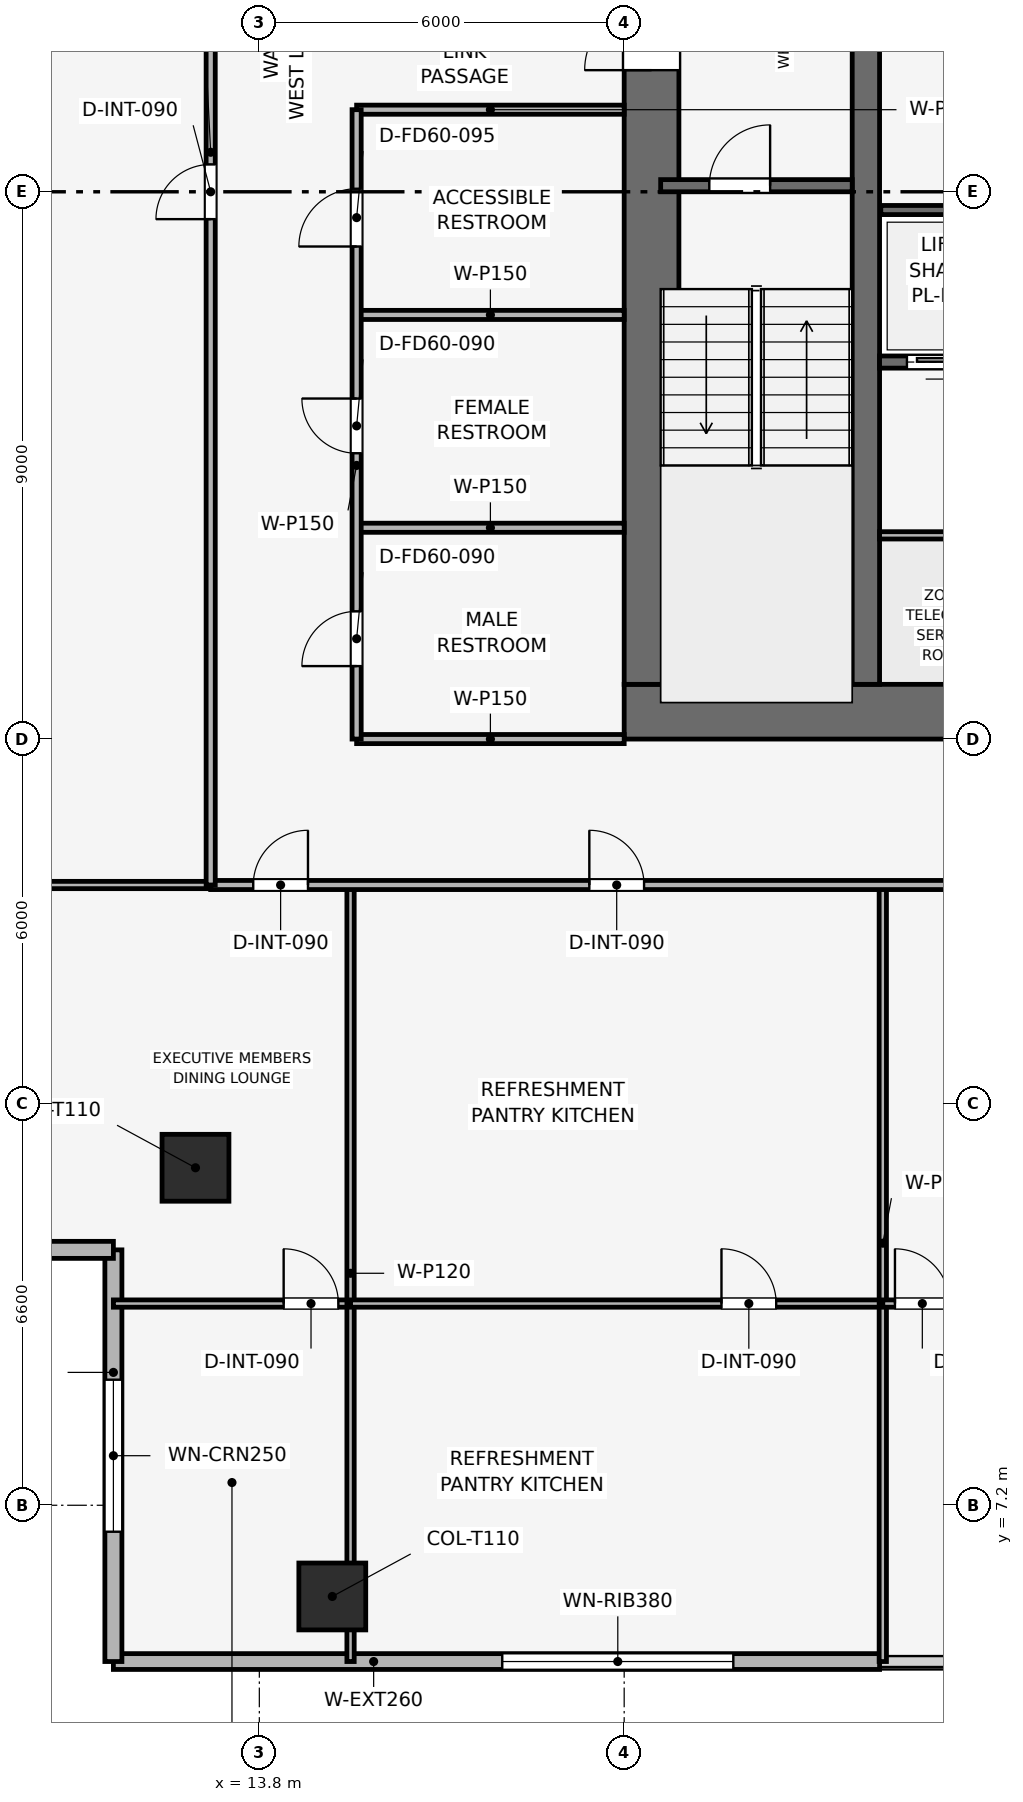
"""IFC4 building model, lengths in metres.
Left out: names, types, materials, properties, quantities, classifications, styles, units other than length and angle.
Written with IfcOpenShell. Run it as: python <this file> out.ifc"""

import sys

from ifc_helpers import new_model, si_unit, direction, frame, frame_2d, origin, origin_2d, place, context, subcontext, project, spatial, rectangle, extrude, element, fill, save


model = new_model("IFC4")
c1 = context("Model", 3, precision=1e-05, world=origin(), true_north=direction((0.0, 1.0)))
c2 = subcontext(c1, "Body", "Model", "MODEL_VIEW")
j1 = project(units=[si_unit("LENGTHUNIT", "METRE"), si_unit("PLANEANGLEUNIT", "RADIAN")], contexts=[c1])
p1 = place(None, origin())
s1 = spatial("IfcSite", under=j1, at=p1, CompositionType="ELEMENT")
p2 = place(p1, origin())
s2 = spatial("IfcBuilding", under=s1, at=p2, CompositionType="ELEMENT")
p3 = place(p2, frame((0.0, 0.0, 168.3)))
s3 = spatial("IfcBuildingStorey", under=s2, at=p3, CompositionType="ELEMENT", Elevation=168.3)
p4 = place(p3, frame((19.8, 20.25, 0.0), z_axis=(0.0, 0.0, 1.0), x_axis=(1.0, 0.0, 0.0)))
e1 = element("IfcWall", 1, at=p4, inside=s3, PredefinedType="SHEAR", context=c2, shape_type="SweptSolid", body=[
    extrude(rectangle(XDim=18.0, YDim=0.9, at=frame_2d((9.0, 0.0))), origin(), (0.0, 0.0, 1.0), 3.75),
])
p5 = place(p4, frame((8.4, 0.0, 0.0)))
e2 = element("IfcOpeningElement", 2, at=p5, cuts=e1, PredefinedType="OPENING", context=c2, shape_type="SweptSolid", body=[
    extrude(rectangle(XDim=1.2, YDim=2.2, at=frame_2d((0.6, 1.1))), frame((0.0, 0.46, 0.0), z_axis=(0.0, -1.0, 0.0), x_axis=(1.0, 0.0, 0.0)), (0.0, 0.0, 1.0), 0.92),
])
p6 = place(p3, frame((20.25, 20.7, 0.0), z_axis=(0.0, 0.0, 1.0), x_axis=(0.0, 1.0, 0.0)))
e3 = element("IfcWall", 3, at=p6, inside=s3, PredefinedType="SHEAR", context=c2, shape_type="SweptSolid", body=[
    extrude(rectangle(XDim=16.2, YDim=0.9, at=frame_2d((8.1, 0.0))), origin(), (0.0, 0.0, 1.0), 3.75),
])
p7 = place(p6, frame((10.1, 0.0, 0.0)))
e4 = element("IfcOpeningElement", 4, at=p7, cuts=e3, PredefinedType="OPENING", context=c2, shape_type="SweptSolid", body=[
    extrude(rectangle(XDim=1.1, YDim=2.15, at=frame_2d((0.55, 1.075))), frame((0.0, 0.46, 0.0), z_axis=(0.0, -1.0, 0.0), x_axis=(1.0, 0.0, 0.0)), (0.0, 0.0, 1.0), 0.92),
])
p8 = place(p3, frame((23.775, 20.7, 0.0), z_axis=(0.0, 0.0, 1.0), x_axis=(0.0, 1.0, 0.0)))
e5 = element("IfcWall", 5, at=p8, inside=s3, PredefinedType="SHEAR", context=c2, shape_type="SweptSolid", body=[
    extrude(rectangle(XDim=16.2, YDim=0.45, at=frame_2d((8.1, 0.0))), origin(), (0.0, 0.0, 1.0), 3.75),
])
for number, where, z_axis, x_axis in (
    (6, (15.0, 5.7, 0.003), (0.0, 0.0, 1.0), (1.0, 0.0, 0.0)),
    (7, (12.75, 12.75, 0.003), (0.0, 0.0, 1.0), (1.0, 0.0, 0.0)),
):
    element("IfcColumn", number, at=place(p3, frame(where, z_axis=z_axis, x_axis=x_axis)), inside=s3, PredefinedType="COLUMN", context=c2, shape_type="SweptSolid", body=[
        extrude(rectangle(XDim=1.1, YDim=1.1, at=origin_2d()), origin(), (0.0, 0.0, 1.0), 3.489),
    ])
p9 = place(p3, frame((24.0, 4.63, 0.0), z_axis=(0.0, 0.0, 1.0), x_axis=(-1.0, 0.0, 0.0)))
e8 = element("IfcWall", 8, at=p9, inside=s3, PredefinedType="SOLIDWALL", context=c2, shape_type="SweptSolid", body=[
    extrude(rectangle(XDim=12.6, YDim=0.26, at=frame_2d((6.3, 0.0))), origin(), (0.0, 0.0, 1.0), 3.495),
])
p10 = place(p9, frame((2.405, 0.0, 0.9)))
e9 = element("IfcOpeningElement", 9, at=p10, cuts=e8, PredefinedType="OPENING", context=c2, shape_type="SweptSolid", body=[
    extrude(rectangle(XDim=3.8, YDim=1.9, at=frame_2d((1.9, 0.95))), frame((0.0, 0.14, 0.0), z_axis=(0.0, -1.0, 0.0), x_axis=(1.0, 0.0, 0.0)), (0.0, 0.0, 1.0), 0.28),
])
p11 = place(p3, frame((11.4, 4.63, 0.0), z_axis=(0.0, 0.0, 1.0), x_axis=(0.0, 1.0, 0.0)))
e10 = element("IfcWall", 10, at=p11, inside=s3, PredefinedType="SOLIDWALL", context=c2, shape_type="SweptSolid", body=[
    extrude(rectangle(XDim=6.77, YDim=0.28, at=frame_2d((3.385, 0.0))), origin(), (0.0, 0.0, 1.0), 3.495),
])
p12 = place(p11, frame((2.135, 0.0, 0.9)))
e11 = element("IfcOpeningElement", 11, at=p12, cuts=e10, PredefinedType="OPENING", context=c2, shape_type="SweptSolid", body=[
    extrude(rectangle(XDim=2.5, YDim=1.9, at=frame_2d((1.25, 0.95))), frame((0.0, 0.15, 0.0), z_axis=(0.0, -1.0, 0.0), x_axis=(1.0, 0.0, 0.0)), (0.0, 0.0, 1.0), 0.3),
])
p13 = place(p3, frame((11.4, 11.4, 0.0), z_axis=(0.0, 0.0, 1.0), x_axis=(-1.0, 0.0, 0.0)))
e12 = element("IfcWall", 12, at=p13, inside=s3, PredefinedType="SOLIDWALL", context=c2, shape_type="SweptSolid", body=[
    extrude(rectangle(XDim=6.77, YDim=0.28, at=frame_2d((3.385, 0.0))), origin(), (0.0, 0.0, 1.0), 3.495),
])
p14 = place(p13, frame((2.135, 0.0, 0.9)))
e13 = element("IfcOpeningElement", 13, at=p14, cuts=e12, PredefinedType="OPENING", context=c2, shape_type="SweptSolid", body=[
    extrude(rectangle(XDim=2.5, YDim=1.9, at=frame_2d((1.25, 0.95))), frame((0.0, 0.15, 0.0), z_axis=(0.0, -1.0, 0.0), x_axis=(1.0, 0.0, 0.0)), (0.0, 0.0, 1.0), 0.3),
])
p15 = place(p3, frame((20.4, 28.9, 0.0), z_axis=(0.0, 0.0, 1.0), x_axis=(1.0, 0.0, 0.0)))
e14 = element("IfcWall", 14, at=p15, inside=s3, PredefinedType="SHEAR", context=c2, shape_type="SweptSolid", body=[
    extrude(rectangle(XDim=3.15, YDim=0.2, at=frame_2d((1.575, 0.0))), origin(), (0.0, 0.0, 1.0), 3.495),
])
p16 = place(p15, frame((0.8, 0.0, 0.0)))
e15 = element("IfcOpeningElement", 15, at=p16, cuts=e14, PredefinedType="OPENING", context=c2, shape_type="SweptSolid", body=[
    extrude(rectangle(XDim=1.0, YDim=2.1, at=frame_2d((0.5, 1.05))), frame((0.0, 0.11, 0.0), z_axis=(0.0, -1.0, 0.0), x_axis=(1.0, 0.0, 0.0)), (0.0, 0.0, 1.0), 0.22),
])
p17 = place(p3, frame((24.0, 26.0, 0.0), z_axis=(0.0, 0.0, 1.0), x_axis=(1.0, 0.0, 0.0)))
e16 = element("IfcWall", 16, at=p17, inside=s3, PredefinedType="SHEAR", context=c2, shape_type="SweptSolid", body=[
    extrude(rectangle(XDim=2.0, YDim=0.2, at=frame_2d((1.0, 0.0))), origin(), (0.0, 0.0, 1.0), 3.495),
])
p18 = place(p17, frame((0.45, 0.0, 0.0)))
e17 = element("IfcOpeningElement", 17, at=p18, cuts=e16, PredefinedType="OPENING", context=c2, shape_type="SweptSolid", body=[
    extrude(rectangle(XDim=1.1, YDim=2.15, at=frame_2d((0.55, 1.075))), frame((0.0, 0.11, 0.0), z_axis=(0.0, -1.0, 0.0), x_axis=(1.0, 0.0, 0.0)), (0.0, 0.0, 1.0), 0.22),
])
p19 = place(p3, frame((24.02, 28.5, 0.0), z_axis=(0.0, 0.0, 1.0), x_axis=(1.0, 0.0, 0.0)))
e18 = element("IfcWall", 18, at=p19, inside=s3, PredefinedType="SHEAR", context=c2, shape_type="SweptSolid", body=[
    extrude(rectangle(XDim=4.08, YDim=0.15, at=frame_2d((2.04, 0.0))), origin(), (0.0, 0.0, 1.0), 3.495),
])
p20 = place(p3, frame((24.0, 23.15, 0.0), z_axis=(0.0, 0.0, 1.0), x_axis=(1.0, 0.0, 0.0)))
e19 = element("IfcWall", 19, at=p20, inside=s3, PredefinedType="PARTITIONING", context=c2, shape_type="SweptSolid", body=[
    extrude(rectangle(XDim=4.05, YDim=0.12, at=frame_2d((2.025, 0.0))), origin(), (0.0, 0.0, 1.0), 3.495),
])
p21 = place(p20, frame((1.575, 0.0, 0.0)))
e20 = element("IfcOpeningElement", 20, at=p21, cuts=e19, PredefinedType="OPENING", context=c2, shape_type="SweptSolid", body=[
    extrude(rectangle(XDim=0.9, YDim=2.1, at=frame_2d((0.45, 1.05))), frame((0.0, 0.07, 0.0), z_axis=(0.0, -1.0, 0.0), x_axis=(1.0, 0.0, 0.0)), (0.0, 0.0, 1.0), 0.14),
])
p22 = place(p3, frame((15.4, 19.8, 0.0), z_axis=(0.0, 0.0, 1.0), x_axis=(1.0, 0.0, 0.0)))
e21 = element("IfcWall", 21, at=p22, inside=s3, PredefinedType="PARTITIONING", context=c2, shape_type="SweptSolid", body=[
    extrude(rectangle(XDim=4.4, YDim=0.15, at=frame_2d((2.2, 0.0))), origin(), (0.0, 0.0, 1.0), 3.03),
])
for number, where, z_axis, x_axis in (
    (22, (15.4, 23.275, 0.0), (0.0, 0.0, 1.0), (1.0, 0.0, 0.0)),
    (23, (15.4, 26.775, 0.0), (0.0, 0.0, 1.0), (1.0, 0.0, 0.0)),
    (24, (15.4, 30.15, 0.0), (0.0, 0.0, 1.0), (1.0, 0.0, 0.0)),
):
    element("IfcWall", number, at=place(p3, frame(where, z_axis=z_axis, x_axis=x_axis)), inside=s3, PredefinedType="PARTITIONING", context=c2, shape_type="SweptSolid", body=[
        extrude(rectangle(XDim=4.4, YDim=0.15, at=frame_2d((2.2, 0.0))), origin(), (0.0, 0.0, 1.0), 3.495),
    ])
p23 = place(p3, frame((15.4, 19.8, 0.0), z_axis=(0.0, 0.0, 1.0), x_axis=(0.0, 1.0, 0.0)))
e25 = element("IfcWall", 25, at=p23, inside=s3, PredefinedType="PARTITIONING", context=c2, shape_type="SweptSolid", body=[
    extrude(rectangle(XDim=10.35, YDim=0.15, at=frame_2d((5.175, 0.0))), origin(), (0.0, 0.0, 1.0), 3.03),
])
p24 = place(p23, frame((1.2, 0.0, 0.0)))
e26 = element("IfcOpeningElement", 26, at=p24, cuts=e25, PredefinedType="OPENING", context=c2, shape_type="SweptSolid", body=[
    extrude(rectangle(XDim=0.9, YDim=2.1, at=frame_2d((0.45, 1.05))), frame((0.0, 0.085, 0.0), z_axis=(0.0, -1.0, 0.0), x_axis=(1.0, 0.0, 0.0)), (0.0, 0.0, 1.0), 0.17),
])
p25 = place(p23, frame((4.7, 0.0, 0.0)))
e27 = element("IfcOpeningElement", 27, at=p25, cuts=e25, PredefinedType="OPENING", context=c2, shape_type="SweptSolid", body=[
    extrude(rectangle(XDim=0.9, YDim=2.1, at=frame_2d((0.45, 1.05))), frame((0.0, 0.085, 0.0), z_axis=(0.0, -1.0, 0.0), x_axis=(1.0, 0.0, 0.0)), (0.0, 0.0, 1.0), 0.17),
])
p26 = place(p23, frame((8.1, 0.0, 0.0)))
e28 = element("IfcOpeningElement", 28, at=p26, cuts=e25, PredefinedType="OPENING", context=c2, shape_type="SweptSolid", body=[
    extrude(rectangle(XDim=0.95, YDim=2.1, at=frame_2d((0.475, 1.05))), frame((0.0, 0.085, 0.0), z_axis=(0.0, -1.0, 0.0), x_axis=(1.0, 0.0, 0.0)), (0.0, 0.0, 1.0), 0.17),
])
p27 = place(p3, frame((11.4, 10.517, 0.0), z_axis=(0.0, 0.0, 1.0), x_axis=(1.0, 0.0, 0.0)))
e29 = element("IfcWall", 29, at=p27, inside=s3, PredefinedType="PARTITIONING", context=c2, shape_type="SweptSolid", body=[
    extrude(rectangle(XDim=3.9, YDim=0.12, at=frame_2d((1.95, 0.0))), origin(), (0.0, 0.0, 1.0), 2.98),
])
p28 = place(p27, frame((2.8, 0.0, 0.0)))
e30 = element("IfcOpeningElement", 30, at=p28, cuts=e29, PredefinedType="OPENING", context=c2, shape_type="SweptSolid", body=[
    extrude(rectangle(XDim=0.9, YDim=2.1, at=frame_2d((0.45, 1.05))), frame((0.0, 0.07, 0.0), z_axis=(0.0, -1.0, 0.0), x_axis=(1.0, 0.0, 0.0)), (0.0, 0.0, 1.0), 0.14),
])
p29 = place(p3, frame((15.3, 4.63, 0.0), z_axis=(0.0, 0.0, 1.0), x_axis=(0.0, 1.0, 0.0)))
e31 = element("IfcWall", 31, at=p29, inside=s3, PredefinedType="PARTITIONING", context=c2, shape_type="SweptSolid", body=[
    extrude(rectangle(XDim=12.77, YDim=0.12, at=frame_2d((6.385, 0.0))), origin(), (0.0, 0.0, 1.0), 2.98),
])
p30 = place(p3, frame((15.3, 10.517, 0.0), z_axis=(0.0, 0.0, 1.0), x_axis=(1.0, 0.0, 0.0)))
e32 = element("IfcWall", 32, at=p30, inside=s3, PredefinedType="PARTITIONING", context=c2, shape_type="SweptSolid", body=[
    extrude(rectangle(XDim=8.753, YDim=0.12, at=frame_2d((4.376, 0.0))), origin(), (0.0, 0.0, 1.0), 3.03),
])
p31 = place(p30, frame((6.1, 0.0, 0.0)))
e33 = element("IfcOpeningElement", 33, at=p31, cuts=e32, PredefinedType="OPENING", context=c2, shape_type="SweptSolid", body=[
    extrude(rectangle(XDim=0.9, YDim=2.1, at=frame_2d((0.45, 1.05))), frame((0.0, 0.07, 0.0), z_axis=(0.0, -1.0, 0.0), x_axis=(1.0, 0.0, 0.0)), (0.0, 0.0, 1.0), 0.14),
])
p32 = place(p3, frame((24.053, 4.63, 0.0), z_axis=(0.0, 0.0, 1.0), x_axis=(0.0, 1.0, 0.0)))
e34 = element("IfcWall", 34, at=p32, inside=s3, PredefinedType="PARTITIONING", context=c2, shape_type="SweptSolid", body=[
    extrude(rectangle(XDim=12.77, YDim=0.12, at=frame_2d((6.385, 0.0))), origin(), (0.0, 0.0, 1.0), 2.98),
])
p33 = place(p3, frame((24.053, 10.517, 0.0), z_axis=(0.0, 0.0, 1.0), x_axis=(1.0, 0.0, 0.0)))
e35 = element("IfcWall", 35, at=p33, inside=s3, PredefinedType="PARTITIONING", context=c2, shape_type="SweptSolid", body=[
    extrude(rectangle(XDim=9.351, YDim=0.12, at=frame_2d((4.676, 0.0))), origin(), (0.0, 0.0, 1.0), 3.03),
])
p34 = place(p33, frame((0.2, 0.0, 0.0)))
e36 = element("IfcOpeningElement", 36, at=p34, cuts=e35, PredefinedType="OPENING", context=c2, shape_type="SweptSolid", body=[
    extrude(rectangle(XDim=0.9, YDim=2.1, at=frame_2d((0.45, 1.05))), frame((0.0, 0.07, 0.0), z_axis=(0.0, -1.0, 0.0), x_axis=(1.0, 0.0, 0.0)), (0.0, 0.0, 1.0), 0.14),
])
p35 = place(p3, frame((4.63, 17.4, 0.0), z_axis=(0.0, 0.0, 1.0), x_axis=(1.0, 0.0, 0.0)))
e37 = element("IfcWall", 37, at=p35, inside=s3, PredefinedType="PARTITIONING", context=c2, shape_type="SweptSolid", body=[
    extrude(rectangle(XDim=8.37, YDim=0.12, at=frame_2d((4.185, 0.0))), origin(), (0.0, 0.0, 1.0), 2.98),
])
p36 = place(p3, frame((13.0, 17.4, 0.0), z_axis=(0.0, 0.0, 1.0), x_axis=(1.0, 0.0, 0.0)))
e38 = element("IfcWall", 38, at=p36, inside=s3, PredefinedType="PARTITIONING", context=c2, shape_type="SweptSolid", body=[
    extrude(rectangle(XDim=31.6, YDim=0.15, at=frame_2d((15.8, 0.0))), origin(), (0.0, 0.0, 1.0), 3.03),
])
p37 = place(p36, frame((0.7, 0.0, 0.0)))
e39 = element("IfcOpeningElement", 39, at=p37, cuts=e38, PredefinedType="OPENING", context=c2, shape_type="SweptSolid", body=[
    extrude(rectangle(XDim=0.9, YDim=2.1, at=frame_2d((0.45, 1.05))), frame((0.0, 0.085, 0.0), z_axis=(0.0, -1.0, 0.0), x_axis=(1.0, 0.0, 0.0)), (0.0, 0.0, 1.0), 0.17),
])
p38 = place(p36, frame((6.227, 0.0, 0.0)))
e40 = element("IfcOpeningElement", 40, at=p38, cuts=e38, PredefinedType="OPENING", context=c2, shape_type="SweptSolid", body=[
    extrude(rectangle(XDim=0.9, YDim=2.1, at=frame_2d((0.45, 1.05))), frame((0.0, 0.085, 0.0), z_axis=(0.0, -1.0, 0.0), x_axis=(1.0, 0.0, 0.0)), (0.0, 0.0, 1.0), 0.17),
])
p39 = place(p36, frame((15.279, 0.0, 0.0)))
e41 = element("IfcOpeningElement", 41, at=p39, cuts=e38, PredefinedType="OPENING", context=c2, shape_type="SweptSolid", body=[
    extrude(rectangle(XDim=0.9, YDim=2.1, at=frame_2d((0.45, 1.05))), frame((0.0, 0.085, 0.0), z_axis=(0.0, -1.0, 0.0), x_axis=(1.0, 0.0, 0.0)), (0.0, 0.0, 1.0), 0.17),
])
p40 = place(p36, frame((25.552, 0.0, 0.0)))
e42 = element("IfcOpeningElement", 42, at=p40, cuts=e38, PredefinedType="OPENING", context=c2, shape_type="SweptSolid", body=[
    extrude(rectangle(XDim=0.9, YDim=2.1, at=frame_2d((0.45, 1.05))), frame((0.0, 0.085, 0.0), z_axis=(0.0, -1.0, 0.0), x_axis=(1.0, 0.0, 0.0)), (0.0, 0.0, 1.0), 0.17),
])
p41 = place(p3, frame((13.0, 17.4, 0.0), z_axis=(0.0, 0.0, 1.0), x_axis=(0.0, 1.0, 0.0)))
e43 = element("IfcWall", 43, at=p41, inside=s3, PredefinedType="PARTITIONING", context=c2, shape_type="SweptSolid", body=[
    extrude(rectangle(XDim=22.8, YDim=0.15, at=frame_2d((11.4, 0.0))), origin(), (0.0, 0.0, 1.0), 3.03),
])
p42 = place(p41, frame((10.95, 0.0, 0.0)))
e44 = element("IfcOpeningElement", 44, at=p42, cuts=e43, PredefinedType="OPENING", context=c2, shape_type="SweptSolid", body=[
    extrude(rectangle(XDim=0.9, YDim=2.1, at=frame_2d((0.45, 1.05))), frame((0.0, 0.085, 0.0), z_axis=(0.0, -1.0, 0.0), x_axis=(1.0, 0.0, 0.0)), (0.0, 0.0, 1.0), 0.17),
])
p43 = place(p10, origin())
e45 = element("IfcWindow", 45, at=p43, inside=s3, PartitioningType="SINGLE_PANEL", PredefinedType="WINDOW", context=c2, shape_type="SweptSolid", body=[
    extrude(rectangle(XDim=3.8, YDim=1.9, at=frame_2d((1.9, 0.95))), frame((0.0, 0.03, 0.0), z_axis=(0.0, -1.0, 0.0), x_axis=(1.0, 0.0, 0.0)), (0.0, 0.0, 1.0), 0.06),
])
fill(e9, e45)
p44 = place(p12, origin())
e46 = element("IfcWindow", 46, at=p44, inside=s3, PartitioningType="SINGLE_PANEL", PredefinedType="WINDOW", context=c2, shape_type="SweptSolid", body=[
    extrude(rectangle(XDim=2.5, YDim=1.9, at=frame_2d((1.25, 0.95))), frame((0.0, 0.03, 0.0), z_axis=(0.0, -1.0, 0.0), x_axis=(1.0, 0.0, 0.0)), (0.0, 0.0, 1.0), 0.06),
])
fill(e11, e46)
p45 = place(p16, origin())
e47 = element("IfcDoor", 47, at=p45, inside=s3, OperationType="SINGLE_SWING_RIGHT", PredefinedType="DOOR", context=c2, shape_type="SweptSolid", body=[
    extrude(rectangle(XDim=1.0, YDim=2.1, at=frame_2d((0.5, 1.05))), frame((0.0, 0.025, 0.0), z_axis=(0.0, -1.0, 0.0), x_axis=(1.0, 0.0, 0.0)), (0.0, 0.0, 1.0), 0.05),
])
fill(e15, e47)
p46 = place(p18, origin())
e48 = element("IfcDoor", 48, at=p46, inside=s3, OperationType="SLIDING_TO_RIGHT", PredefinedType="DOOR", context=c2, shape_type="SweptSolid", body=[
    extrude(rectangle(XDim=1.1, YDim=2.15, at=frame_2d((0.55, 1.075))), frame((0.0, 0.025, 0.0), z_axis=(0.0, -1.0, 0.0), x_axis=(1.0, 0.0, 0.0)), (0.0, 0.0, 1.0), 0.05),
])
fill(e17, e48)
p47 = place(p24, origin())
e49 = element("IfcDoor", 49, at=p47, inside=s3, OperationType="SINGLE_SWING_LEFT", PredefinedType="DOOR", context=c2, shape_type="SweptSolid", body=[
    extrude(rectangle(XDim=0.9, YDim=2.1, at=frame_2d((0.45, 1.05))), frame((0.0, 0.025, 0.0), z_axis=(0.0, -1.0, 0.0), x_axis=(1.0, 0.0, 0.0)), (0.0, 0.0, 1.0), 0.05),
])
fill(e26, e49)
p48 = place(p25, origin())
e50 = element("IfcDoor", 50, at=p48, inside=s3, OperationType="SINGLE_SWING_RIGHT", PredefinedType="DOOR", context=c2, shape_type="SweptSolid", body=[
    extrude(rectangle(XDim=0.9, YDim=2.1, at=frame_2d((0.45, 1.05))), frame((0.0, 0.025, 0.0), z_axis=(0.0, -1.0, 0.0), x_axis=(1.0, 0.0, 0.0)), (0.0, 0.0, 1.0), 0.05),
])
fill(e27, e50)
p49 = place(p26, origin())
e51 = element("IfcDoor", 51, at=p49, inside=s3, OperationType="SINGLE_SWING_LEFT", PredefinedType="DOOR", context=c2, shape_type="SweptSolid", body=[
    extrude(rectangle(XDim=0.95, YDim=2.1, at=frame_2d((0.475, 1.05))), frame((0.0, 0.025, 0.0), z_axis=(0.0, -1.0, 0.0), x_axis=(1.0, 0.0, 0.0)), (0.0, 0.0, 1.0), 0.05),
])
fill(e28, e51)
p50 = place(p28, origin())
e52 = element("IfcDoor", 52, at=p50, inside=s3, OperationType="SINGLE_SWING_LEFT", PredefinedType="DOOR", context=c2, shape_type="SweptSolid", body=[
    extrude(rectangle(XDim=0.9, YDim=2.1, at=frame_2d((0.45, 1.05))), frame((0.0, 0.025, 0.0), z_axis=(0.0, -1.0, 0.0), x_axis=(1.0, 0.0, 0.0)), (0.0, 0.0, 1.0), 0.05),
])
fill(e30, e52)
p51 = place(p31, origin())
e53 = element("IfcDoor", 53, at=p51, inside=s3, OperationType="SINGLE_SWING_LEFT", PredefinedType="DOOR", context=c2, shape_type="SweptSolid", body=[
    extrude(rectangle(XDim=0.9, YDim=2.1, at=frame_2d((0.45, 1.05))), frame((0.0, 0.025, 0.0), z_axis=(0.0, -1.0, 0.0), x_axis=(1.0, 0.0, 0.0)), (0.0, 0.0, 1.0), 0.05),
])
fill(e33, e53)
p52 = place(p34, origin())
e54 = element("IfcDoor", 54, at=p52, inside=s3, OperationType="SINGLE_SWING_LEFT", PredefinedType="DOOR", context=c2, shape_type="SweptSolid", body=[
    extrude(rectangle(XDim=0.9, YDim=2.1, at=frame_2d((0.45, 1.05))), frame((0.0, 0.025, 0.0), z_axis=(0.0, -1.0, 0.0), x_axis=(1.0, 0.0, 0.0)), (0.0, 0.0, 1.0), 0.05),
])
fill(e36, e54)
p53 = place(p37, origin())
e55 = element("IfcDoor", 55, at=p53, inside=s3, OperationType="SINGLE_SWING_RIGHT", PredefinedType="DOOR", context=c2, shape_type="SweptSolid", body=[
    extrude(rectangle(XDim=0.9, YDim=2.1, at=frame_2d((0.45, 1.05))), frame((0.0, 0.025, 0.0), z_axis=(0.0, -1.0, 0.0), x_axis=(1.0, 0.0, 0.0)), (0.0, 0.0, 1.0), 0.05),
])
fill(e39, e55)
p54 = place(p38, origin())
e56 = element("IfcDoor", 56, at=p54, inside=s3, OperationType="SINGLE_SWING_LEFT", PredefinedType="DOOR", context=c2, shape_type="SweptSolid", body=[
    extrude(rectangle(XDim=0.9, YDim=2.1, at=frame_2d((0.45, 1.05))), frame((0.0, 0.025, 0.0), z_axis=(0.0, -1.0, 0.0), x_axis=(1.0, 0.0, 0.0)), (0.0, 0.0, 1.0), 0.05),
])
fill(e40, e56)
p55 = place(p42, origin())
e57 = element("IfcDoor", 57, at=p55, inside=s3, OperationType="SINGLE_SWING_LEFT", PredefinedType="DOOR", context=c2, shape_type="SweptSolid", body=[
    extrude(rectangle(XDim=0.9, YDim=2.1, at=frame_2d((0.45, 1.05))), frame((0.0, 0.025, 0.0), z_axis=(0.0, -1.0, 0.0), x_axis=(1.0, 0.0, 0.0)), (0.0, 0.0, 1.0), 0.05),
])
fill(e44, e57)
p56 = place(p7, origin())
e58 = element("IfcDoor", 58, at=p56, inside=s3, OperationType="SINGLE_SWING_LEFT", PredefinedType="DOOR", context=c2, shape_type="SweptSolid", body=[
    extrude(rectangle(XDim=1.1, YDim=2.15, at=frame_2d((0.55, 1.075))), frame((0.0, 0.025, 0.0), z_axis=(0.0, -1.0, 0.0), x_axis=(1.0, 0.0, 0.0)), (0.0, 0.0, 1.0), 0.05),
])
fill(e4, e58)
save(model, sys.argv[1])
